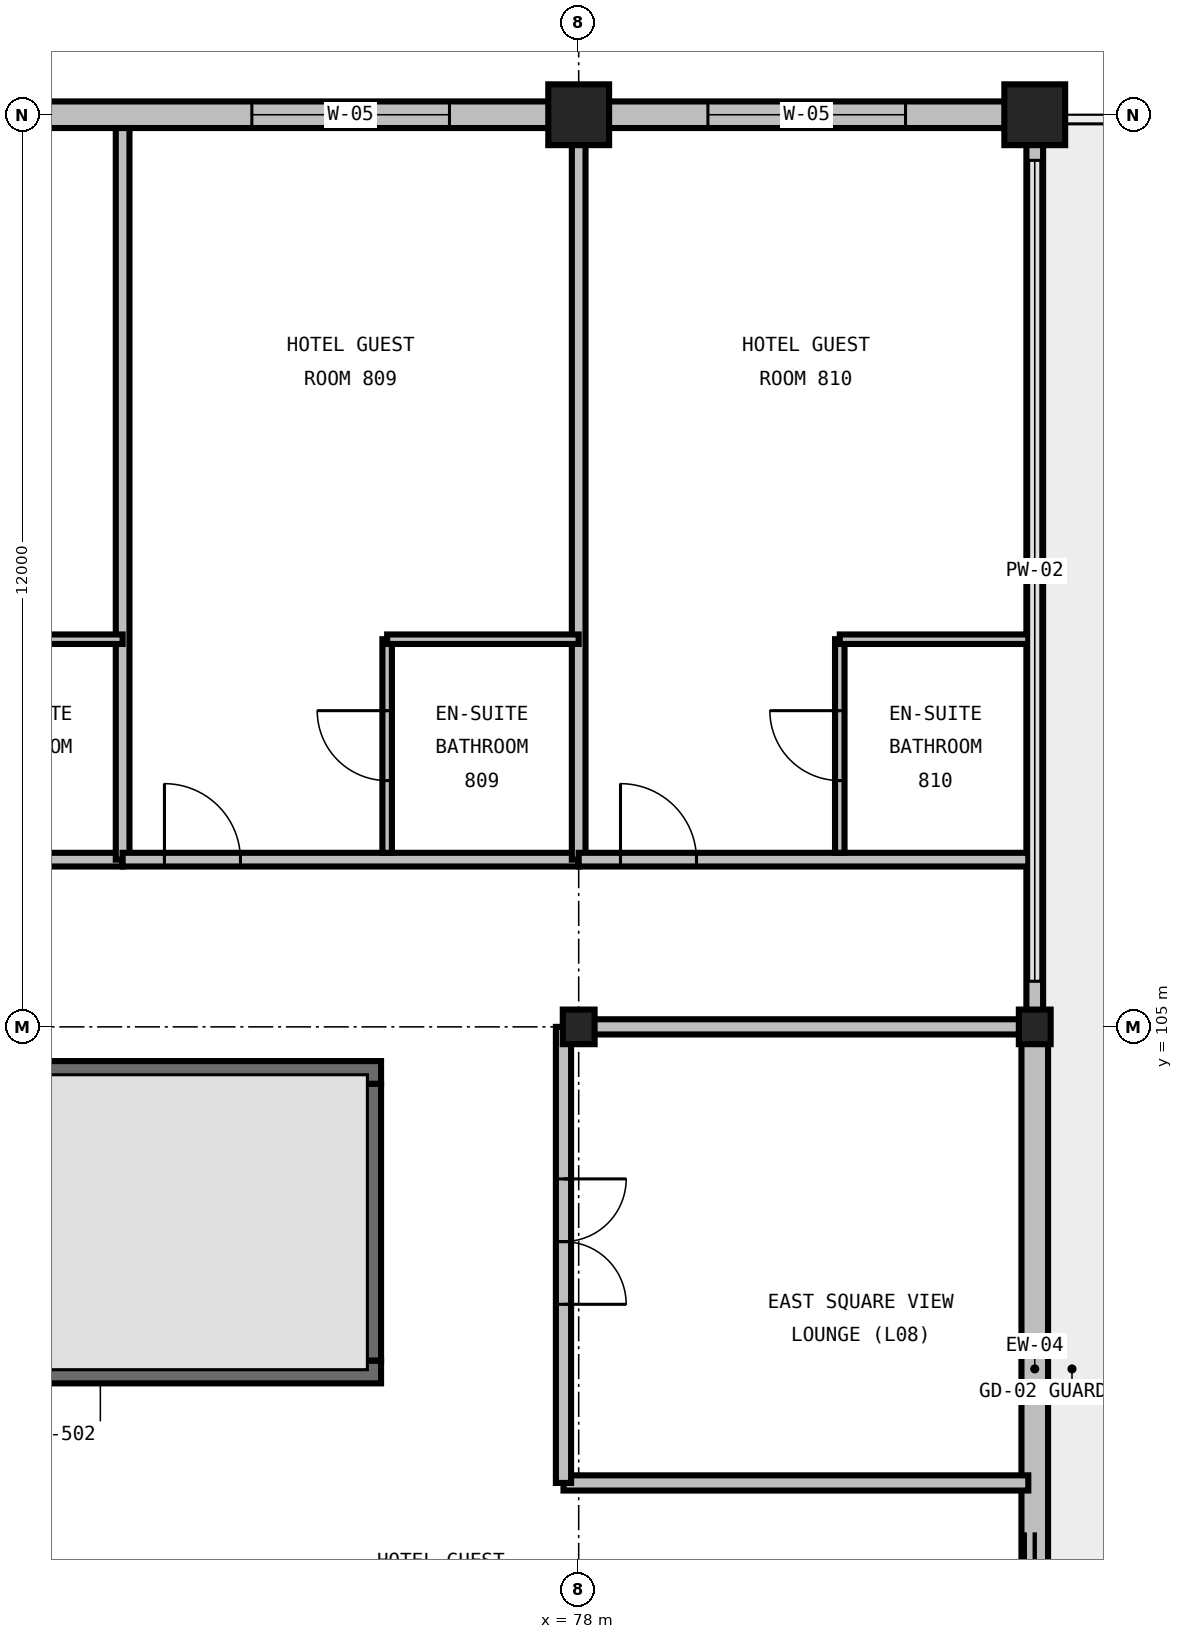
"""IFC4 building model, lengths in metres.
Left out: names, types, materials, properties, quantities, classifications, styles, units other than length and angle.
Written with IfcOpenShell. Run it as: python <this file> out.ifc"""

import sys

from ifc_helpers import new_model, si_unit, direction, frame, frame_2d, origin, origin_2d, place, context, subcontext, project, spatial, rectangle, i_section, extrude, element, fill, save


model = new_model("IFC4")
c1 = context("Model", 3, precision=1e-05, world=origin(), true_north=direction((0.0, 1.0)))
c2 = subcontext(c1, "Body", "Model", "MODEL_VIEW")
j1 = project(units=[si_unit("LENGTHUNIT", "METRE"), si_unit("PLANEANGLEUNIT", "RADIAN")], contexts=[c1])
p1 = place(None, origin())
s1 = spatial("IfcSite", under=j1, at=p1, CompositionType="ELEMENT")
p2 = place(p1, origin())
s2 = spatial("IfcBuilding", under=s1, at=p2, CompositionType="ELEMENT")
p3 = place(p2, frame((0.0, 0.0, 38.4)))
s3 = spatial("IfcBuildingStorey", under=s2, at=p3, CompositionType="ELEMENT", Elevation=38.4)
p4 = place(p3, frame((78.0, 105.0, 0.0), z_axis=(0.0, 0.0, 1.0), x_axis=(1.0, 0.0, 0.0)))
e1 = element("IfcColumn", 1, at=p4, inside=s3, PredefinedType="COLUMN", context=c2, shape_type="SweptSolid", body=[
    extrude(i_section(OverallWidth=0.419, OverallDepth=0.455, WebThickness=0.042, FlangeThickness=0.068, FilletRadius=0.031, at=origin_2d()), origin(), (0.0, 0.0, 1.0), 3.6),
])
p5 = place(p3, frame((78.0, 117.0, 0.0), z_axis=(0.0, 0.0, 1.0), x_axis=(1.0, 0.0, 0.0)))
e2 = element("IfcColumn", 2, at=p5, inside=s3, PredefinedType="COLUMN", context=c2, shape_type="SweptSolid", body=[
    extrude(rectangle(XDim=0.8, YDim=0.8, at=origin_2d()), origin(), (0.0, 0.0, 1.0), 3.6),
])
p6 = place(p3, frame((84.0, 105.0, 0.0), z_axis=(0.0, 0.0, 1.0), x_axis=(1.0, 0.0, 0.0)))
e3 = element("IfcColumn", 3, at=p6, inside=s3, PredefinedType="COLUMN", context=c2, shape_type="SweptSolid", body=[
    extrude(i_section(OverallWidth=0.419, OverallDepth=0.455, WebThickness=0.042, FlangeThickness=0.068, FilletRadius=0.031, at=origin_2d()), origin(), (0.0, 0.0, 1.0), 3.6),
])
p7 = place(p3, frame((84.0, 117.0, 0.0), z_axis=(0.0, 0.0, 1.0), x_axis=(1.0, 0.0, 0.0)))
e4 = element("IfcColumn", 4, at=p7, inside=s3, PredefinedType="COLUMN", context=c2, shape_type="SweptSolid", body=[
    extrude(rectangle(XDim=0.8, YDim=0.8, at=origin_2d()), origin(), (0.0, 0.0, 1.0), 3.6),
])
p8 = place(p3, frame((65.6, 100.46, 0.0), z_axis=(0.0, 0.0, 1.0), x_axis=(1.0, 0.0, 0.0)))
e5 = element("IfcWall", 5, at=p8, inside=s3, PredefinedType="SHEAR", context=c2, shape_type="SweptSolid", body=[
    extrude(rectangle(XDim=9.8, YDim=0.3, at=frame_2d((4.9, 0.0))), origin(), (0.0, 0.0, 1.0), 3.6),
])
p9 = place(p8, frame((0.45, 0.0, 0.0)))
e6 = element("IfcOpeningElement", 6, at=p9, cuts=e5, PredefinedType="OPENING", context=c2, shape_type="SweptSolid", body=[
    extrude(rectangle(XDim=1.1, YDim=2.2, at=frame_2d((0.55, 1.1))), frame((0.0, 0.165, 0.0), z_axis=(0.0, -1.0, 0.0), x_axis=(1.0, 0.0, 0.0)), (0.0, 0.0, 1.0), 0.33),
])
p10 = place(p3, frame((75.4, 104.4, 0.0), z_axis=(0.0, 0.0, 1.0), x_axis=(-1.0, 0.0, 0.0)))
e7 = element("IfcWall", 7, at=p10, inside=s3, PredefinedType="SHEAR", context=c2, shape_type="SweptSolid", body=[
    extrude(rectangle(XDim=9.8, YDim=0.3, at=frame_2d((4.9, 0.0))), origin(), (0.0, 0.0, 1.0), 3.6),
])
p11 = place(p3, frame((75.25, 100.61, 0.0), z_axis=(0.0, 0.0, 1.0), x_axis=(0.0, 1.0, 0.0)))
e8 = element("IfcWall", 8, at=p11, inside=s3, PredefinedType="SHEAR", context=c2, shape_type="SweptSolid", body=[
    extrude(rectangle(XDim=3.64, YDim=0.3, at=frame_2d((1.82, 0.0))), origin(), (0.0, 0.0, 1.0), 3.6),
])
p12 = place(p3, frame((78.0, 117.0, 0.0), z_axis=(0.0, 0.0, 1.0), x_axis=(-1.0, 0.0, 0.0)))
e9 = element("IfcWall", 9, at=p12, inside=s3, PredefinedType="STANDARD", context=c2, shape_type="SweptSolid", body=[
    extrude(rectangle(XDim=12.0, YDim=0.35, at=frame_2d((6.0, 0.0))), origin(), (0.0, 0.0, 1.0), 2.486),
])
p13 = place(p12, frame((1.7, 0.0, 0.72)))
e10 = element("IfcOpeningElement", 10, at=p13, cuts=e9, PredefinedType="OPENING", context=c2, shape_type="SweptSolid", body=[
    extrude(rectangle(XDim=2.6, YDim=1.69, at=frame_2d((1.3, 0.845))), frame((0.0, 0.19, 0.0), z_axis=(0.0, -1.0, 0.0), x_axis=(1.0, 0.0, 0.0)), (0.0, 0.0, 1.0), 0.38),
])
p14 = place(p12, frame((7.625, 0.0, 0.72)))
e11 = element("IfcOpeningElement", 11, at=p14, cuts=e9, PredefinedType="OPENING", context=c2, shape_type="SweptSolid", body=[
    extrude(rectangle(XDim=2.75, YDim=1.69, at=frame_2d((1.375, 0.845))), frame((0.0, 0.19, 0.0), z_axis=(0.0, -1.0, 0.0), x_axis=(1.0, 0.0, 0.0)), (0.0, 0.0, 1.0), 0.38),
])
p15 = place(p3, frame((84.0, 117.0, 0.0), z_axis=(0.0, 0.0, 1.0), x_axis=(-1.0, 0.0, 0.0)))
e12 = element("IfcWall", 12, at=p15, inside=s3, PredefinedType="STANDARD", context=c2, shape_type="SweptSolid", body=[
    extrude(rectangle(XDim=6.0, YDim=0.35, at=frame_2d((3.0, 0.0))), origin(), (0.0, 0.0, 1.0), 2.486),
])
p16 = place(p15, frame((1.7, 0.0, 0.72)))
e13 = element("IfcOpeningElement", 13, at=p16, cuts=e12, PredefinedType="OPENING", context=c2, shape_type="SweptSolid", body=[
    extrude(rectangle(XDim=2.6, YDim=1.69, at=frame_2d((1.3, 0.845))), frame((0.0, 0.19, 0.0), z_axis=(0.0, -1.0, 0.0), x_axis=(1.0, 0.0, 0.0)), (0.0, 0.0, 1.0), 0.38),
])
p17 = place(p3, frame((84.0, 96.0, 0.0), z_axis=(0.0, 0.0, 1.0), x_axis=(0.0, 1.0, 0.0)))
e14 = element("IfcWall", 14, at=p17, inside=s3, PredefinedType="STANDARD", context=c2, shape_type="SweptSolid", body=[
    extrude(rectangle(XDim=9.0, YDim=0.35, at=frame_2d((4.5, 0.0))), origin(), (0.0, 0.0, 1.0), 2.981),
])
p18 = place(p17, frame((0.75, 0.0, 0.0)))
e15 = element("IfcOpeningElement", 15, at=p18, cuts=e14, PredefinedType="OPENING", context=c2, shape_type="SweptSolid", body=[
    extrude(rectangle(XDim=1.6, YDim=2.15, at=frame_2d((0.8, 1.075))), frame((0.0, 0.19, 0.0), z_axis=(0.0, -1.0, 0.0), x_axis=(1.0, 0.0, 0.0)), (0.0, 0.0, 1.0), 0.38),
])
p19 = place(p3, frame((84.0, 105.0, 0.0), z_axis=(0.0, 0.0, 1.0), x_axis=(0.0, 1.0, 0.0)))
e16 = element("IfcWall", 16, at=p19, inside=s3, PredefinedType="PARAPET", context=c2, shape_type="SweptSolid", body=[
    extrude(rectangle(XDim=12.0, YDim=0.22, at=frame_2d((6.0, 0.0))), origin(), (0.0, 0.0, 1.0), 0.2),
])
p20 = place(p3, frame((66.0, 107.2, 0.0), z_axis=(0.0, 0.0, 1.0), x_axis=(1.0, 0.0, 0.0)))
e17 = element("IfcWall", 17, at=p20, inside=s3, PredefinedType="PARTITIONING", context=c2, shape_type="SweptSolid", body=[
    extrude(rectangle(XDim=6.0, YDim=0.18, at=frame_2d((3.0, 0.0))), origin(), (0.0, 0.0, 1.0), 3.29),
])
p21 = place(p20, frame((0.55, 0.0, 0.0)))
e18 = element("IfcOpeningElement", 18, at=p21, cuts=e17, PredefinedType="OPENING", context=c2, shape_type="SweptSolid", body=[
    extrude(rectangle(XDim=1.0, YDim=2.15, at=frame_2d((0.5, 1.075))), frame((0.0, 0.105, 0.0), z_axis=(0.0, -1.0, 0.0), x_axis=(1.0, 0.0, 0.0)), (0.0, 0.0, 1.0), 0.21),
])
p22 = place(p3, frame((72.0, 107.2, 0.0), z_axis=(0.0, 0.0, 1.0), x_axis=(0.0, 1.0, 0.0)))
e19 = element("IfcWall", 19, at=p22, inside=s3, PredefinedType="PARTITIONING", context=c2, shape_type="SweptSolid", body=[
    extrude(rectangle(XDim=9.625, YDim=0.18, at=frame_2d((4.812, 0.0))), origin(), (0.0, 0.0, 1.0), 3.29),
])
p23 = place(p3, frame((69.48, 110.1, 0.0), z_axis=(0.0, 0.0, 1.0), x_axis=(1.0, 0.0, 0.0)))
e20 = element("IfcWall", 20, at=p23, inside=s3, PredefinedType="PARTITIONING", context=c2, shape_type="SweptSolid", body=[
    extrude(rectangle(XDim=2.52, YDim=0.125, at=frame_2d((1.26, 0.0))), origin(), (0.0, 0.0, 1.0), 3.29),
])
p24 = place(p3, frame((72.0, 107.2, 0.0), z_axis=(0.0, 0.0, 1.0), x_axis=(1.0, 0.0, 0.0)))
e21 = element("IfcWall", 21, at=p24, inside=s3, PredefinedType="PARTITIONING", context=c2, shape_type="SweptSolid", body=[
    extrude(rectangle(XDim=6.0, YDim=0.18, at=frame_2d((3.0, 0.0))), origin(), (0.0, 0.0, 1.0), 3.29),
])
p25 = place(p24, frame((0.55, 0.0, 0.0)))
e22 = element("IfcOpeningElement", 22, at=p25, cuts=e21, PredefinedType="OPENING", context=c2, shape_type="SweptSolid", body=[
    extrude(rectangle(XDim=1.0, YDim=2.15, at=frame_2d((0.5, 1.075))), frame((0.0, 0.105, 0.0), z_axis=(0.0, -1.0, 0.0), x_axis=(1.0, 0.0, 0.0)), (0.0, 0.0, 1.0), 0.21),
])
p26 = place(p3, frame((78.0, 107.2, 0.0), z_axis=(0.0, 0.0, 1.0), x_axis=(0.0, 1.0, 0.0)))
e23 = element("IfcWall", 23, at=p26, inside=s3, PredefinedType="PARTITIONING", context=c2, shape_type="SweptSolid", body=[
    extrude(rectangle(XDim=9.625, YDim=0.18, at=frame_2d((4.812, 0.0))), origin(), (0.0, 0.0, 1.0), 2.59),
])
p27 = place(p3, frame((75.48, 107.29, 0.0), z_axis=(0.0, 0.0, 1.0), x_axis=(0.0, 1.0, 0.0)))
e24 = element("IfcWall", 24, at=p27, inside=s3, PredefinedType="PARTITIONING", context=c2, shape_type="SweptSolid", body=[
    extrude(rectangle(XDim=2.81, YDim=0.125, at=frame_2d((1.405, 0.0))), origin(), (0.0, 0.0, 1.0), 3.29),
])
p28 = place(p27, frame((0.95, 0.0, 0.0)))
e25 = element("IfcOpeningElement", 25, at=p28, cuts=e24, PredefinedType="OPENING", context=c2, shape_type="SweptSolid", body=[
    extrude(rectangle(XDim=0.92, YDim=2.1, at=frame_2d((0.46, 1.05))), frame((0.0, 0.077, 0.0), z_axis=(0.0, -1.0, 0.0), x_axis=(1.0, 0.0, 0.0)), (0.0, 0.0, 1.0), 0.155),
])
p29 = place(p3, frame((75.48, 110.1, 0.0), z_axis=(0.0, 0.0, 1.0), x_axis=(1.0, 0.0, 0.0)))
e26 = element("IfcWall", 26, at=p29, inside=s3, PredefinedType="PARTITIONING", context=c2, shape_type="SweptSolid", body=[
    extrude(rectangle(XDim=2.52, YDim=0.125, at=frame_2d((1.26, 0.0))), origin(), (0.0, 0.0, 1.0), 3.29),
])
p30 = place(p3, frame((78.0, 107.2, 0.0), z_axis=(0.0, 0.0, 1.0), x_axis=(1.0, 0.0, 0.0)))
e27 = element("IfcWall", 27, at=p30, inside=s3, PredefinedType="PARTITIONING", context=c2, shape_type="SweptSolid", body=[
    extrude(rectangle(XDim=5.915, YDim=0.18, at=frame_2d((2.957, 0.0))), origin(), (0.0, 0.0, 1.0), 3.29),
])
p31 = place(p30, frame((0.55, 0.0, 0.0)))
e28 = element("IfcOpeningElement", 28, at=p31, cuts=e27, PredefinedType="OPENING", context=c2, shape_type="SweptSolid", body=[
    extrude(rectangle(XDim=1.0, YDim=2.15, at=frame_2d((0.5, 1.075))), frame((0.0, 0.105, 0.0), z_axis=(0.0, -1.0, 0.0), x_axis=(1.0, 0.0, 0.0)), (0.0, 0.0, 1.0), 0.21),
])
p32 = place(p3, frame((81.435, 107.29, 0.0), z_axis=(0.0, 0.0, 1.0), x_axis=(0.0, 1.0, 0.0)))
e29 = element("IfcWall", 29, at=p32, inside=s3, PredefinedType="PARTITIONING", context=c2, shape_type="SweptSolid", body=[
    extrude(rectangle(XDim=2.81, YDim=0.125, at=frame_2d((1.405, 0.0))), origin(), (0.0, 0.0, 1.0), 3.29),
])
p33 = place(p32, frame((0.95, 0.0, 0.0)))
e30 = element("IfcOpeningElement", 30, at=p33, cuts=e29, PredefinedType="OPENING", context=c2, shape_type="SweptSolid", body=[
    extrude(rectangle(XDim=0.92, YDim=2.1, at=frame_2d((0.46, 1.05))), frame((0.0, 0.077, 0.0), z_axis=(0.0, -1.0, 0.0), x_axis=(1.0, 0.0, 0.0)), (0.0, 0.0, 1.0), 0.155),
])
p34 = place(p3, frame((81.435, 110.1, 0.0), z_axis=(0.0, 0.0, 1.0), x_axis=(1.0, 0.0, 0.0)))
e31 = element("IfcWall", 31, at=p34, inside=s3, PredefinedType="PARTITIONING", context=c2, shape_type="SweptSolid", body=[
    extrude(rectangle(XDim=2.48, YDim=0.125, at=frame_2d((1.24, 0.0))), origin(), (0.0, 0.0, 1.0), 3.29),
])
p35 = place(p3, frame((77.8, 99.0, 0.0), z_axis=(0.0, 0.0, 1.0), x_axis=(1.0, 0.0, 0.0)))
e32 = element("IfcWall", 32, at=p35, inside=s3, PredefinedType="PARTITIONING", context=c2, shape_type="SweptSolid", body=[
    extrude(rectangle(XDim=6.115, YDim=0.2, at=frame_2d((3.057, 0.0))), origin(), (0.0, 0.0, 1.0), 3.29),
])
p36 = place(p3, frame((83.915, 105.0, 0.0), z_axis=(0.0, 0.0, 1.0), x_axis=(-1.0, 0.0, 0.0)))
e33 = element("IfcWall", 33, at=p36, inside=s3, PredefinedType="PARTITIONING", context=c2, shape_type="SweptSolid", body=[
    extrude(rectangle(XDim=6.115, YDim=0.2, at=frame_2d((3.057, 0.0))), origin(), (0.0, 0.0, 1.0), 2.736),
])
p37 = place(p3, frame((77.8, 105.0, 0.0), z_axis=(0.0, 0.0, 1.0), x_axis=(0.0, -1.0, 0.0)))
e34 = element("IfcWall", 34, at=p37, inside=s3, PredefinedType="PARTITIONING", context=c2, shape_type="SweptSolid", body=[
    extrude(rectangle(XDim=6.0, YDim=0.2, at=frame_2d((3.0, 0.0))), origin(), (0.0, 0.0, 1.0), 3.29),
])
p38 = place(p37, frame((2.0, 0.0, 0.0)))
e35 = element("IfcOpeningElement", 35, at=p38, cuts=e34, PredefinedType="OPENING", context=c2, shape_type="SweptSolid", body=[
    extrude(rectangle(XDim=1.65, YDim=2.25, at=frame_2d((0.825, 1.125))), frame((0.0, 0.115, 0.0), z_axis=(0.0, -1.0, 0.0), x_axis=(1.0, 0.0, 0.0)), (0.0, 0.0, 1.0), 0.23),
])
p39 = place(p13, origin())
e36 = element("IfcWindow", 36, at=p39, inside=s3, PartitioningType="DOUBLE_PANEL_VERTICAL", PredefinedType="WINDOW", context=c2, shape_type="SweptSolid", body=[
    extrude(rectangle(XDim=2.6, YDim=1.69, at=frame_2d((1.3, 0.845))), frame((0.0, 0.03, 0.0), z_axis=(0.0, -1.0, 0.0), x_axis=(1.0, 0.0, 0.0)), (0.0, 0.0, 1.0), 0.06),
])
fill(e10, e36)
p40 = place(p16, origin())
e37 = element("IfcWindow", 37, at=p40, inside=s3, PartitioningType="DOUBLE_PANEL_VERTICAL", PredefinedType="WINDOW", context=c2, shape_type="SweptSolid", body=[
    extrude(rectangle(XDim=2.6, YDim=1.69, at=frame_2d((1.3, 0.845))), frame((0.0, 0.03, 0.0), z_axis=(0.0, -1.0, 0.0), x_axis=(1.0, 0.0, 0.0)), (0.0, 0.0, 1.0), 0.06),
])
fill(e13, e37)
p41 = place(p18, origin())
e38 = element("IfcDoor", 38, at=p41, inside=s3, OperationType="DOUBLE_DOOR_SLIDING", PredefinedType="DOOR", context=c2, shape_type="SweptSolid", body=[
    extrude(rectangle(XDim=1.6, YDim=2.15, at=frame_2d((0.8, 1.075))), frame((0.0, 0.025, 0.0), z_axis=(0.0, -1.0, 0.0), x_axis=(1.0, 0.0, 0.0)), (0.0, 0.0, 1.0), 0.05),
])
fill(e15, e38)
p42 = place(p25, origin())
e39 = element("IfcDoor", 39, at=p42, inside=s3, OperationType="SINGLE_SWING_LEFT", PredefinedType="DOOR", context=c2, shape_type="SweptSolid", body=[
    extrude(rectangle(XDim=1.0, YDim=2.15, at=frame_2d((0.5, 1.075))), frame((0.0, 0.025, 0.0), z_axis=(0.0, -1.0, 0.0), x_axis=(1.0, 0.0, 0.0)), (0.0, 0.0, 1.0), 0.05),
])
fill(e22, e39)
p43 = place(p28, origin())
e40 = element("IfcDoor", 40, at=p43, inside=s3, OperationType="SINGLE_SWING_RIGHT", PredefinedType="DOOR", context=c2, shape_type="SweptSolid", body=[
    extrude(rectangle(XDim=0.92, YDim=2.1, at=frame_2d((0.46, 1.05))), frame((0.0, 0.025, 0.0), z_axis=(0.0, -1.0, 0.0), x_axis=(1.0, 0.0, 0.0)), (0.0, 0.0, 1.0), 0.05),
])
fill(e25, e40)
p44 = place(p31, origin())
e41 = element("IfcDoor", 41, at=p44, inside=s3, OperationType="SINGLE_SWING_LEFT", PredefinedType="DOOR", context=c2, shape_type="SweptSolid", body=[
    extrude(rectangle(XDim=1.0, YDim=2.15, at=frame_2d((0.5, 1.075))), frame((0.0, 0.025, 0.0), z_axis=(0.0, -1.0, 0.0), x_axis=(1.0, 0.0, 0.0)), (0.0, 0.0, 1.0), 0.05),
])
fill(e28, e41)
p45 = place(p33, origin())
e42 = element("IfcDoor", 42, at=p45, inside=s3, OperationType="SINGLE_SWING_RIGHT", PredefinedType="DOOR", context=c2, shape_type="SweptSolid", body=[
    extrude(rectangle(XDim=0.92, YDim=2.1, at=frame_2d((0.46, 1.05))), frame((0.0, 0.025, 0.0), z_axis=(0.0, -1.0, 0.0), x_axis=(1.0, 0.0, 0.0)), (0.0, 0.0, 1.0), 0.05),
])
fill(e30, e42)
p46 = place(p38, origin())
e43 = element("IfcDoor", 43, at=p46, inside=s3, OperationType="DOUBLE_DOOR_SINGLE_SWING", PredefinedType="DOOR", context=c2, shape_type="SweptSolid", body=[
    extrude(rectangle(XDim=1.65, YDim=2.25, at=frame_2d((0.825, 1.125))), frame((0.0, 0.025, 0.0), z_axis=(0.0, -1.0, 0.0), x_axis=(1.0, 0.0, 0.0)), (0.0, 0.0, 1.0), 0.05),
])
fill(e35, e43)
save(model, sys.argv[1])
